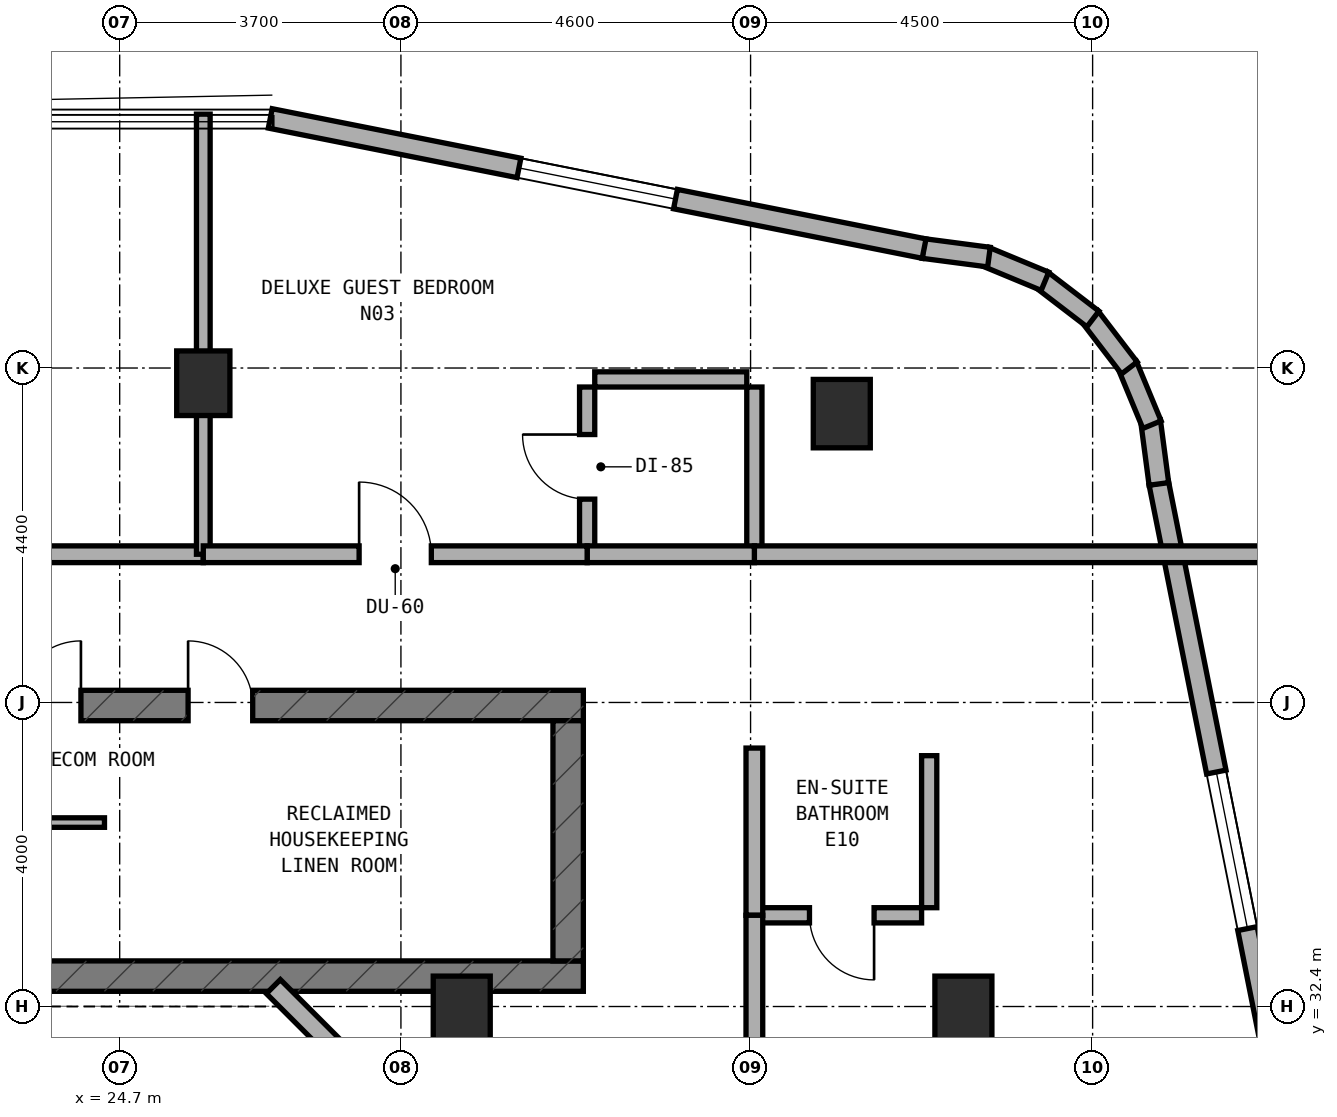
"""IFC4 building model, lengths in metres.
Left out: names, types, materials, properties, quantities, classifications, styles, units other than length and angle.
Written with IfcOpenShell. Run it as: python <this file> out.ifc"""

import sys

from ifc_helpers import new_model, si_unit, direction, frame, frame_2d, origin, origin_2d, place, context, subcontext, project, spatial, rectangle, extrude, element, fill, save


model = new_model("IFC4")
c1 = context("Model", 3, precision=1e-05, world=origin(), true_north=direction((0.0, 1.0)))
c2 = subcontext(c1, "Body", "Model", "MODEL_VIEW")
j1 = project(units=[si_unit("LENGTHUNIT", "METRE"), si_unit("PLANEANGLEUNIT", "RADIAN")], contexts=[c1])
p1 = place(None, origin())
s1 = spatial("IfcSite", under=j1, at=p1, CompositionType="ELEMENT")
p2 = place(p1, origin())
s2 = spatial("IfcBuilding", under=s1, at=p2, CompositionType="ELEMENT")
p3 = place(p2, frame((0.0, 0.0, 217.1)))
s3 = spatial("IfcBuildingStorey", under=s2, at=p3, CompositionType="ELEMENT", Elevation=217.1)
p4 = place(p3, frame((6.4, 32.8, 0.0), z_axis=(0.0, 0.0, 1.0), x_axis=(1.0, 0.0, 0.0)))
e1 = element("IfcWall", 1, at=p4, inside=s3, PredefinedType="SHEAR", context=c2, shape_type="SweptSolid", body=[
    extrude(rectangle(XDim=24.4, YDim=0.4, at=frame_2d((12.2, 0.0))), origin(), (0.0, 0.0, 1.0), 3.6),
])
p5 = place(p4, frame((6.05, 0.0, 0.0)))
e2 = element("IfcOpeningElement", 2, at=p5, cuts=e1, PredefinedType="OPENING", context=c2, shape_type="SweptSolid", body=[
    extrude(rectangle(XDim=1.1, YDim=2.15, at=frame_2d((0.55, 1.075))), frame((0.0, 0.21, 0.0), z_axis=(0.0, -1.0, 0.0), x_axis=(1.0, 0.0, 0.0)), (0.0, 0.0, 1.0), 0.42),
])
p6 = place(p3, frame((6.4, 36.36, 0.0), z_axis=(0.0, 0.0, 1.0), x_axis=(1.0, 0.0, 0.0)))
e3 = element("IfcWall", 3, at=p6, inside=s3, PredefinedType="SHEAR", context=c2, shape_type="SweptSolid", body=[
    extrude(rectangle(XDim=24.4, YDim=0.4, at=frame_2d((12.2, 0.0))), origin(), (0.0, 0.0, 1.0), 3.6),
])
p7 = place(p6, frame((9.15, 0.0, 0.0)))
e4 = element("IfcOpeningElement", 4, at=p7, cuts=e3, PredefinedType="OPENING", context=c2, shape_type="SweptSolid", body=[
    extrude(rectangle(XDim=1.2, YDim=2.15, at=frame_2d((0.6, 1.075))), frame((0.0, 0.21, 0.0), z_axis=(0.0, -1.0, 0.0), x_axis=(1.0, 0.0, 0.0)), (0.0, 0.0, 1.0), 0.42),
])
p8 = place(p6, frame((19.2, 0.0, 0.0)))
e5 = element("IfcOpeningElement", 5, at=p8, cuts=e3, PredefinedType="OPENING", context=c2, shape_type="SweptSolid", body=[
    extrude(rectangle(XDim=0.85, YDim=2.1, at=frame_2d((0.425, 1.05))), frame((0.0, 0.21, 0.0), z_axis=(0.0, -1.0, 0.0), x_axis=(1.0, 0.0, 0.0)), (0.0, 0.0, 1.0), 0.42),
])
p9 = place(p6, frame((16.94, 0.0, 0.0)))
e6 = element("IfcOpeningElement", 6, at=p9, cuts=e3, PredefinedType="OPENING", context=c2, shape_type="SweptSolid", body=[
    extrude(rectangle(XDim=0.85, YDim=2.1, at=frame_2d((0.425, 1.05))), frame((0.0, 0.21, 0.0), z_axis=(0.0, -1.0, 0.0), x_axis=(1.0, 0.0, 0.0)), (0.0, 0.0, 1.0), 0.42),
])
p10 = place(p3, frame((30.6, 33.0, 0.0), z_axis=(0.0, 0.0, 1.0), x_axis=(0.0, 1.0, 0.0)))
e7 = element("IfcWall", 7, at=p10, inside=s3, PredefinedType="SHEAR", context=c2, shape_type="SweptSolid", body=[
    extrude(rectangle(XDim=3.16, YDim=0.4, at=frame_2d((1.58, 0.0))), origin(), (0.0, 0.0, 1.0), 3.6),
])
p11 = place(p3, frame((25.8, 40.6, 0.0), z_axis=(0.0, 0.0, 1.0), x_axis=(1.0, 0.0, 0.0)))
e8 = element("IfcColumn", 8, at=p11, inside=s3, PredefinedType="COLUMN", context=c2, shape_type="SweptSolid", body=[
    extrude(rectangle(XDim=0.7, YDim=0.85, at=origin_2d()), origin(), (0.0, 0.0, 1.0), 3.6),
])
for number, where, z_axis, x_axis in (
    (9, (34.2, 40.2, 0.0), (0.0, 0.0, 1.0), (1.0, 0.0, 0.0)),
    (10, (35.8, 32.35, 0.0), (0.0, 0.0, 1.0), (1.0, 0.0, 0.0)),
    (11, (29.2, 32.35, 0.0), (0.0, 0.0, 1.0), (1.0, 0.0, 0.0)),
):
    element("IfcColumn", number, at=place(p3, frame(where, z_axis=z_axis, x_axis=x_axis)), inside=s3, PredefinedType="COLUMN", context=c2, shape_type="SweptSolid", body=[
        extrude(rectangle(XDim=0.75, YDim=0.9, at=origin_2d()), origin(), (0.0, 0.0, 1.0), 3.6),
    ])
p12 = place(p3, frame((40.084, 30.681, 0.0), z_axis=(0.0, 0.0, 1.0), x_axis=(-0.195291715883, 0.980745199176, 0.0)))
e12 = element("IfcWall", 12, at=p12, inside=s3, PredefinedType="STANDARD", context=c2, shape_type="SweptSolid", body=[
    extrude(rectangle(XDim=8.771, YDim=0.26, at=frame_2d((4.385, 0.0))), origin(), (0.0, 0.0, 1.0), 3.32),
])
p13 = place(p12, frame((2.798, 0.0, 0.85)))
e13 = element("IfcOpeningElement", 13, at=p13, cuts=e12, PredefinedType="OPENING", context=c2, shape_type="SweptSolid", body=[
    extrude(rectangle(XDim=2.1, YDim=1.5, at=frame_2d((1.05, 0.75))), frame((0.0, 0.14, 0.0), z_axis=(0.0, -1.0, 0.0), x_axis=(1.0, 0.0, 0.0)), (0.0, 0.0, 1.0), 0.28),
])
p14 = place(p3, frame((38.372, 39.275, 0.0), z_axis=(0.0, 0.0, 1.0), x_axis=(-0.130954667764, 0.9913883573, 0.0)))
e14 = element("IfcWall", 14, at=p14, inside=s3, PredefinedType="STANDARD", context=c2, shape_type="SweptSolid", body=[
    extrude(rectangle(XDim=0.833, YDim=0.26, at=frame_2d((0.417, 0.0))), origin(), (0.0, 0.0, 1.0), 3.32),
])
p15 = place(p3, frame((38.281, 40.055, 0.0), z_axis=(0.0, 0.0, 1.0), x_axis=(-0.382985169477, 0.923754491172, 0.0)))
e15 = element("IfcWall", 15, at=p15, inside=s3, PredefinedType="STANDARD", context=c2, shape_type="SweptSolid", body=[
    extrude(rectangle(XDim=0.851, YDim=0.26, at=frame_2d((0.426, 0.0))), origin(), (0.0, 0.0, 1.0), 3.32),
])
for number, where, z_axis, x_axis in (
    (16, (37.983, 40.801, 0.0), (0.0, 0.0, 1.0), (-0.608, 0.794, 0.0)),
    (17, (37.504, 41.445, 0.0), (0.0, 0.0, 1.0), (-0.794, 0.608, 0.0)),
):
    element("IfcWall", number, at=place(p3, frame(where, z_axis=z_axis, x_axis=x_axis)), inside=s3, PredefinedType="STANDARD", context=c2, shape_type="SweptSolid", body=[
        extrude(rectangle(XDim=0.85, YDim=0.26, at=frame_2d((0.425, 0.0))), origin(), (0.0, 0.0, 1.0), 3.32),
    ])
p16 = place(p3, frame((36.873, 41.941, 0.0), z_axis=(0.0, 0.0, 1.0), x_axis=(-0.923652976167, 0.383229930484, 0.0)))
e18 = element("IfcWall", 18, at=p16, inside=s3, PredefinedType="STANDARD", context=c2, shape_type="SweptSolid", body=[
    extrude(rectangle(XDim=0.851, YDim=0.26, at=frame_2d((0.426, 0.0))), origin(), (0.0, 0.0, 1.0), 3.32),
])
p17 = place(p3, frame((36.136, 42.259, 0.0), z_axis=(0.0, 0.0, 1.0), x_axis=(-0.991493480548, 0.130156359936, 0.0)))
e19 = element("IfcWall", 19, at=p17, inside=s3, PredefinedType="STANDARD", context=c2, shape_type="SweptSolid", body=[
    extrude(rectangle(XDim=0.868, YDim=0.26, at=frame_2d((0.434, 0.0))), origin(), (0.0, 0.0, 1.0), 3.32),
])
p18 = place(p3, frame((35.283, 42.371, 0.0), z_axis=(0.0, 0.0, 1.0), x_axis=(-0.980745199176, 0.195291715883, 0.0)))
e20 = element("IfcWall", 20, at=p18, inside=s3, PredefinedType="STANDARD", context=c2, shape_type="SweptSolid", body=[
    extrude(rectangle(XDim=8.771, YDim=0.26, at=frame_2d((4.385, 0.0))), origin(), (0.0, 0.0, 1.0), 3.32),
])
p19 = place(p18, frame((3.335, 0.0, 0.85)))
e21 = element("IfcOpeningElement", 21, at=p19, cuts=e20, PredefinedType="OPENING", context=c2, shape_type="SweptSolid", body=[
    extrude(rectangle(XDim=2.1, YDim=1.5, at=frame_2d((1.05, 0.75))), frame((0.0, 0.14, 0.0), z_axis=(0.0, -1.0, 0.0), x_axis=(1.0, 0.0, 0.0)), (0.0, 0.0, 1.0), 0.28),
])
p20 = place(p3, frame((28.556, 30.828, 0.0), z_axis=(0.0, 0.0, 1.0), x_axis=(-0.707059717605, 0.707153841636, 0.0)))
e22 = element("IfcWall", 22, at=p20, inside=s3, PredefinedType="STANDARD", context=c2, shape_type="SweptSolid", body=[
    extrude(rectangle(XDim=2.594, YDim=0.26, at=frame_2d((1.297, 0.0))), origin(), (0.0, 0.0, 1.0), 3.32),
])
p21 = place(p3, frame((23.15, 34.82, 0.0), z_axis=(0.0, 0.0, 1.0), x_axis=(1.0, 0.0, 0.0)))
e23 = element("IfcWall", 23, at=p21, inside=s3, PredefinedType="PARTITIONING", context=c2, shape_type="SweptSolid", body=[
    extrude(rectangle(XDim=1.35, YDim=0.125, at=frame_2d((0.675, 0.0))), origin(), (0.0, 0.0, 1.0), 3.32),
])
p22 = place(p3, frame((18.4, 38.35, 0.0), z_axis=(0.0, 0.0, 1.0), x_axis=(1.0, 0.0, 0.0)))
e24 = element("IfcWall", 24, at=p22, inside=s3, PredefinedType="SOLIDWALL", context=c2, shape_type="SweptSolid", body=[
    extrude(rectangle(XDim=7.4, YDim=0.22, at=frame_2d((3.7, 0.0))), origin(), (0.0, 0.0, 1.0), 2.695),
])
p23 = place(p22, frame((3.225, 0.0, 0.0)))
e25 = element("IfcOpeningElement", 25, at=p23, cuts=e24, PredefinedType="OPENING", context=c2, shape_type="SweptSolid", body=[
    extrude(rectangle(XDim=0.95, YDim=2.1, at=frame_2d((0.475, 1.05))), frame((0.0, 0.12, 0.0), z_axis=(0.0, -1.0, 0.0), x_axis=(1.0, 0.0, 0.0)), (0.0, 0.0, 1.0), 0.24),
])
p24 = place(p3, frame((25.8, 38.35, 0.0), z_axis=(0.0, 0.0, 1.0), x_axis=(0.0, 1.0, 0.0)))
e26 = element("IfcWall", 26, at=p24, inside=s3, PredefinedType="SOLIDWALL", context=c2, shape_type="SweptSolid", body=[
    extrude(rectangle(XDim=5.79, YDim=0.18, at=frame_2d((2.895, 0.0))), origin(), (0.0, 0.0, 1.0), 2.695),
])
p25 = place(p3, frame((30.85, 38.45, 0.0), z_axis=(0.0, 0.0, 1.0), x_axis=(0.0, 1.0, 0.0)))
e27 = element("IfcWall", 27, at=p25, inside=s3, PredefinedType="PLUMBINGWALL", context=c2, shape_type="SweptSolid", body=[
    extrude(rectangle(XDim=2.1, YDim=0.2, at=frame_2d((1.05, 0.0))), origin(), (0.0, 0.0, 1.0), 2.995),
])
p26 = place(p25, frame((0.625, 0.0, 0.0)))
e28 = element("IfcOpeningElement", 28, at=p26, cuts=e27, PredefinedType="OPENING", context=c2, shape_type="SweptSolid", body=[
    extrude(rectangle(XDim=0.85, YDim=2.1, at=frame_2d((0.425, 1.05))), frame((0.0, 0.11, 0.0), z_axis=(0.0, -1.0, 0.0), x_axis=(1.0, 0.0, 0.0)), (0.0, 0.0, 1.0), 0.22),
])
p27 = place(p3, frame((30.95, 40.65, 0.0), z_axis=(0.0, 0.0, 1.0), x_axis=(1.0, 0.0, 0.0)))
e29 = element("IfcWall", 29, at=p27, inside=s3, PredefinedType="PLUMBINGWALL", context=c2, shape_type="SweptSolid", body=[
    extrude(rectangle(XDim=2.0, YDim=0.2, at=frame_2d((1.0, 0.0))), origin(), (0.0, 0.0, 1.0), 3.32),
])
p28 = place(p3, frame((33.05, 38.45, 0.0), z_axis=(0.0, 0.0, 1.0), x_axis=(0.0, 1.0, 0.0)))
e30 = element("IfcWall", 30, at=p28, inside=s3, PredefinedType="PLUMBINGWALL", context=c2, shape_type="SweptSolid", body=[
    extrude(rectangle(XDim=2.1, YDim=0.2, at=frame_2d((1.05, 0.0))), origin(), (0.0, 0.0, 1.0), 2.995),
])
p29 = place(p3, frame((33.05, 38.35, 0.0), z_axis=(0.0, 0.0, 1.0), x_axis=(1.0, 0.0, 0.0)))
e31 = element("IfcWall", 31, at=p29, inside=s3, PredefinedType="SOLIDWALL", context=c2, shape_type="SweptSolid", body=[
    extrude(rectangle(XDim=6.99, YDim=0.22, at=frame_2d((3.495, 0.0))), origin(), (0.0, 0.0, 1.0), 2.695),
])
p30 = place(p3, frame((30.85, 38.35, 0.0), z_axis=(0.0, 0.0, 1.0), x_axis=(1.0, 0.0, 0.0)))
e32 = element("IfcWall", 32, at=p30, inside=s3, PredefinedType="SOLIDWALL", context=c2, shape_type="SweptSolid", body=[
    extrude(rectangle(XDim=2.2, YDim=0.22, at=frame_2d((1.1, 0.0))), origin(), (0.0, 0.0, 1.0), 3.32),
])
p31 = place(p3, frame((25.8, 38.35, 0.0), z_axis=(0.0, 0.0, 1.0), x_axis=(1.0, 0.0, 0.0)))
e33 = element("IfcWall", 33, at=p31, inside=s3, PredefinedType="SOLIDWALL", context=c2, shape_type="SweptSolid", body=[
    extrude(rectangle(XDim=5.05, YDim=0.22, at=frame_2d((2.525, 0.0))), origin(), (0.0, 0.0, 1.0), 2.695),
])
p32 = place(p31, frame((2.05, 0.0, 0.0)))
e34 = element("IfcOpeningElement", 34, at=p32, cuts=e33, PredefinedType="OPENING", context=c2, shape_type="SweptSolid", body=[
    extrude(rectangle(XDim=0.95, YDim=2.1, at=frame_2d((0.475, 1.05))), frame((0.0, 0.12, 0.0), z_axis=(0.0, -1.0, 0.0), x_axis=(1.0, 0.0, 0.0)), (0.0, 0.0, 1.0), 0.24),
])
p33 = place(p3, frame((33.15, 33.6, 0.0), z_axis=(0.0, 0.0, 1.0), x_axis=(1.0, 0.0, 0.0)))
e35 = element("IfcWall", 35, at=p33, inside=s3, PredefinedType="PLUMBINGWALL", context=c2, shape_type="SweptSolid", body=[
    extrude(rectangle(XDim=2.1, YDim=0.2, at=frame_2d((1.05, 0.0))), origin(), (0.0, 0.0, 1.0), 3.32),
])
p34 = place(p33, frame((0.625, 0.0, 0.0)))
e36 = element("IfcOpeningElement", 36, at=p34, cuts=e35, PredefinedType="OPENING", context=c2, shape_type="SweptSolid", body=[
    extrude(rectangle(XDim=0.85, YDim=2.1, at=frame_2d((0.425, 1.05))), frame((0.0, 0.11, 0.0), z_axis=(0.0, -1.0, 0.0), x_axis=(1.0, 0.0, 0.0)), (0.0, 0.0, 1.0), 0.22),
])
p35 = place(p3, frame((35.35, 33.7, 0.0), z_axis=(0.0, 0.0, 1.0), x_axis=(0.0, 1.0, 0.0)))
e37 = element("IfcWall", 37, at=p35, inside=s3, PredefinedType="PLUMBINGWALL", context=c2, shape_type="SweptSolid", body=[
    extrude(rectangle(XDim=2.0, YDim=0.2, at=frame_2d((1.0, 0.0))), origin(), (0.0, 0.0, 1.0), 3.015),
])
p36 = place(p3, frame((33.05, 33.6, 0.0), z_axis=(0.0, 0.0, 1.0), x_axis=(0.0, 1.0, 0.0)))
e38 = element("IfcWall", 38, at=p36, inside=s3, PredefinedType="SOLIDWALL", context=c2, shape_type="SweptSolid", body=[
    extrude(rectangle(XDim=2.2, YDim=0.22, at=frame_2d((1.1, 0.0))), origin(), (0.0, 0.0, 1.0), 3.32),
])
p37 = place(p3, frame((33.05, 25.77, 0.0), z_axis=(0.0, 0.0, 1.0), x_axis=(0.0, 1.0, 0.0)))
e39 = element("IfcWall", 39, at=p37, inside=s3, PredefinedType="SOLIDWALL", context=c2, shape_type="SweptSolid", body=[
    extrude(rectangle(XDim=7.83, YDim=0.22, at=frame_2d((3.915, 0.0))), origin(), (0.0, 0.0, 1.0), 2.695),
])
p38 = place(p37, frame((3.44, 0.0, 0.0)))
e40 = element("IfcOpeningElement", 40, at=p38, cuts=e39, PredefinedType="OPENING", context=c2, shape_type="SweptSolid", body=[
    extrude(rectangle(XDim=0.95, YDim=2.1, at=frame_2d((0.475, 1.05))), frame((0.0, 0.12, 0.0), z_axis=(0.0, -1.0, 0.0), x_axis=(1.0, 0.0, 0.0)), (0.0, 0.0, 1.0), 0.24),
])
p39 = place(p13, origin())
e41 = element("IfcWindow", 41, at=p39, inside=s3, PartitioningType="SINGLE_PANEL", PredefinedType="WINDOW", context=c2, shape_type="SweptSolid", body=[
    extrude(rectangle(XDim=2.1, YDim=1.5, at=frame_2d((1.05, 0.75))), frame((0.0, 0.03, 0.0), z_axis=(0.0, -1.0, 0.0), x_axis=(1.0, 0.0, 0.0)), (0.0, 0.0, 1.0), 0.06),
])
fill(e13, e41)
p40 = place(p19, origin())
e42 = element("IfcWindow", 42, at=p40, inside=s3, PartitioningType="SINGLE_PANEL", PredefinedType="WINDOW", context=c2, shape_type="SweptSolid", body=[
    extrude(rectangle(XDim=2.1, YDim=1.5, at=frame_2d((1.05, 0.75))), frame((0.0, 0.03, 0.0), z_axis=(0.0, -1.0, 0.0), x_axis=(1.0, 0.0, 0.0)), (0.0, 0.0, 1.0), 0.06),
])
fill(e21, e42)
p41 = place(p8, origin())
e43 = element("IfcDoor", 43, at=p41, inside=s3, OperationType="SINGLE_SWING_LEFT", PredefinedType="DOOR", context=c2, shape_type="SweptSolid", body=[
    extrude(rectangle(XDim=0.85, YDim=2.1, at=frame_2d((0.425, 1.05))), frame((0.0, 0.025, 0.0), z_axis=(0.0, -1.0, 0.0), x_axis=(1.0, 0.0, 0.0)), (0.0, 0.0, 1.0), 0.05),
])
fill(e5, e43)
p42 = place(p9, origin())
e44 = element("IfcDoor", 44, at=p42, inside=s3, OperationType="SINGLE_SWING_RIGHT", PredefinedType="DOOR", context=c2, shape_type="SweptSolid", body=[
    extrude(rectangle(XDim=0.85, YDim=2.1, at=frame_2d((0.425, 1.05))), frame((0.0, 0.025, 0.0), z_axis=(0.0, -1.0, 0.0), x_axis=(1.0, 0.0, 0.0)), (0.0, 0.0, 1.0), 0.05),
])
fill(e6, e44)
p43 = place(p26, origin())
e45 = element("IfcDoor", 45, at=p43, inside=s3, OperationType="SINGLE_SWING_RIGHT", PredefinedType="DOOR", context=c2, shape_type="SweptSolid", body=[
    extrude(rectangle(XDim=0.85, YDim=2.1, at=frame_2d((0.425, 1.05))), frame((0.0, 0.025, 0.0), z_axis=(0.0, -1.0, 0.0), x_axis=(1.0, 0.0, 0.0)), (0.0, 0.0, 1.0), 0.05),
])
fill(e28, e45)
p44 = place(p32, origin())
e46 = element("IfcDoor", 46, at=p44, inside=s3, OperationType="SINGLE_SWING_LEFT", PredefinedType="DOOR", context=c2, shape_type="SweptSolid", body=[
    extrude(rectangle(XDim=0.95, YDim=2.1, at=frame_2d((0.475, 1.05))), frame((0.0, 0.025, 0.0), z_axis=(0.0, -1.0, 0.0), x_axis=(1.0, 0.0, 0.0)), (0.0, 0.0, 1.0), 0.05),
])
fill(e34, e46)
p45 = place(p34, frame((0.85, 0.0, 0.0), z_axis=(0.0, 0.0, 1.0), x_axis=(-1.0, 0.0, 0.0)))
e47 = element("IfcDoor", 47, at=p45, inside=s3, OperationType="SINGLE_SWING_LEFT", PredefinedType="DOOR", context=c2, shape_type="SweptSolid", body=[
    extrude(rectangle(XDim=0.85, YDim=2.1, at=frame_2d((0.425, 1.05))), frame((0.0, 0.025, 0.0), z_axis=(0.0, -1.0, 0.0), x_axis=(1.0, 0.0, 0.0)), (0.0, 0.0, 1.0), 0.05),
])
fill(e36, e47)
save(model, sys.argv[1])
